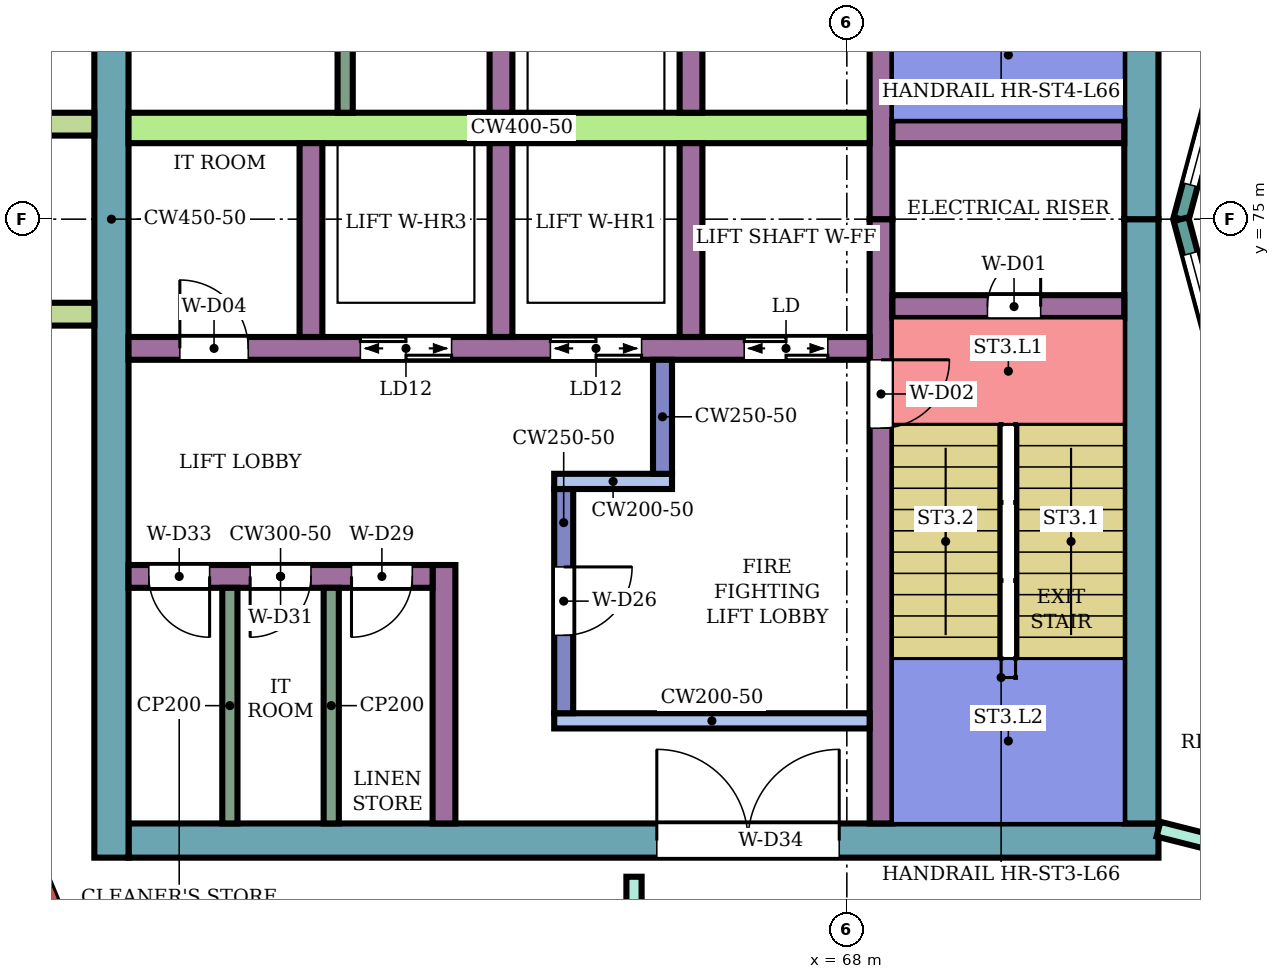
"""IFC4 building model, lengths in metres.
Left out: names, types, materials, properties, quantities, classifications, styles, units other than length and angle.
Written with IfcOpenShell. Run it as: python <this file> out.ifc"""

import sys

from ifc_helpers import new_model, si_unit, direction, frame, frame_2d, origin, place, context, subcontext, project, spatial, rectangle, extrude, element, fill, save


model = new_model("IFC4")
c1 = context("Model", 3, precision=1e-05, world=origin(), true_north=direction((0.0, 1.0)))
c2 = subcontext(c1, "Body", "Model", "MODEL_VIEW")
j1 = project(units=[si_unit("LENGTHUNIT", "METRE"), si_unit("PLANEANGLEUNIT", "RADIAN")], contexts=[c1])
p1 = place(None, origin())
s1 = spatial("IfcSite", under=j1, at=p1, CompositionType="ELEMENT")
p2 = place(p1, origin())
s2 = spatial("IfcBuilding", under=s1, at=p2, CompositionType="ELEMENT")
p3 = place(p2, frame((0.0, 0.0, 288.3)))
s3 = spatial("IfcBuildingStorey", under=s2, at=p3, CompositionType="ELEMENT", Elevation=288.3)
p4 = place(p3, frame((72.1, 66.825, 0.0), z_axis=(0.0, 0.0, 1.0), x_axis=(-1.0, 0.0, 0.0)))
e1 = element("IfcWall", 1, at=p4, inside=s3, PredefinedType="SHEAR", context=c2, shape_type="SweptSolid", body=[
    extrude(rectangle(XDim=13.55, YDim=0.45, at=frame_2d((6.775, 0.0))), origin(), (0.0, 0.0, 1.0), 3.88),
])
p5 = place(p4, frame((4.2, 0.0, 0.0)))
e2 = element("IfcOpeningElement", 2, at=p5, cuts=e1, PredefinedType="OPENING", context=c2, shape_type="SweptSolid", body=[
    extrude(rectangle(XDim=2.4, YDim=2.4, at=frame_2d((1.2, 1.2))), frame((0.0, 0.235, 0.0), z_axis=(0.0, -1.0, 0.0), x_axis=(1.0, 0.0, 0.0)), (0.0, 0.0, 1.0), 0.47),
])
for number, where, z_axis, x_axis in (
    (3, (71.875, 75.0, 0.0), (0.0, 0.0, 1.0), (0.0, -1.0, 0.0)),
    (4, (71.875, 82.95, 0.0), (0.0, 0.0, 1.0), (0.0, -1.0, 0.0)),
):
    element("IfcWall", number, at=place(p3, frame(where, z_axis=z_axis, x_axis=x_axis)), inside=s3, PredefinedType="SHEAR", context=c2, shape_type="SweptSolid", body=[
        extrude(rectangle(XDim=7.95, YDim=0.45, at=frame_2d((3.975, 0.0))), origin(), (0.0, 0.0, 1.0), 3.88),
    ])
p6 = place(p3, frame((58.325, 83.4, 0.0), z_axis=(0.0, 0.0, 1.0), x_axis=(0.0, -1.0, 0.0)))
e5 = element("IfcWall", 5, at=p6, inside=s3, PredefinedType="SHEAR", context=c2, shape_type="SweptSolid", body=[
    extrude(rectangle(XDim=16.8, YDim=0.45, at=frame_2d((8.4, 0.0))), origin(), (0.0, 0.0, 1.0), 3.88),
])
p7 = place(p3, frame((68.45, 75.0, 0.0), z_axis=(0.0, 0.0, 1.0), x_axis=(0.0, -1.0, 0.0)))
e6 = element("IfcWall", 6, at=p7, inside=s3, PredefinedType="SHEAR", context=c2, shape_type="SweptSolid", body=[
    extrude(rectangle(XDim=7.95, YDim=0.3, at=frame_2d((3.975, 0.0))), origin(), (0.0, 0.0, 1.0), 3.88),
])
p8 = place(p7, frame((1.85, 0.0, 0.0)))
e7 = element("IfcOpeningElement", 7, at=p8, cuts=e6, PredefinedType="OPENING", context=c2, shape_type="SweptSolid", body=[
    extrude(rectangle(XDim=0.9, YDim=2.1, at=frame_2d((0.45, 1.05))), frame((0.0, 0.16, 0.0), z_axis=(0.0, -1.0, 0.0), x_axis=(1.0, 0.0, 0.0)), (0.0, 0.0, 1.0), 0.32),
])
p9 = place(p3, frame((68.45, 82.95, 0.0), z_axis=(0.0, 0.0, 1.0), x_axis=(0.0, -1.0, 0.0)))
e8 = element("IfcWall", 8, at=p9, inside=s3, PredefinedType="SHEAR", context=c2, shape_type="SweptSolid", body=[
    extrude(rectangle(XDim=7.95, YDim=0.3, at=frame_2d((3.975, 0.0))), origin(), (0.0, 0.0, 1.0), 3.88),
])
p10 = place(p9, frame((0.6, 0.0, 0.0)))
e9 = element("IfcOpeningElement", 9, at=p10, cuts=e8, PredefinedType="OPENING", context=c2, shape_type="SweptSolid", body=[
    extrude(rectangle(XDim=0.9, YDim=2.1, at=frame_2d((0.45, 1.05))), frame((0.0, 0.16, 0.0), z_axis=(0.0, -1.0, 0.0), x_axis=(1.0, 0.0, 0.0)), (0.0, 0.0, 1.0), 0.32),
])
p11 = place(p3, frame((71.65, 73.85, 0.0), z_axis=(0.0, 0.0, 1.0), x_axis=(-1.0, 0.0, 0.0)))
e10 = element("IfcWall", 10, at=p11, inside=s3, PredefinedType="SHEAR", context=c2, shape_type="SweptSolid", body=[
    extrude(rectangle(XDim=3.05, YDim=0.3, at=frame_2d((1.525, 0.0))), origin(), (0.0, 0.0, 1.0), 3.88),
])
p12 = place(p11, frame((1.1, 0.0, 0.0)))
e11 = element("IfcOpeningElement", 11, at=p12, cuts=e10, PredefinedType="OPENING", context=c2, shape_type="SweptSolid", body=[
    extrude(rectangle(XDim=0.7, YDim=2.0, at=frame_2d((0.35, 1.0))), frame((0.0, 0.16, 0.0), z_axis=(0.0, -1.0, 0.0), x_axis=(1.0, 0.0, 0.0)), (0.0, 0.0, 1.0), 0.32),
])
p13 = place(p3, frame((71.65, 76.15, 0.0), z_axis=(0.0, 0.0, 1.0), x_axis=(-1.0, 0.0, 0.0)))
e12 = element("IfcWall", 12, at=p13, inside=s3, PredefinedType="SHEAR", context=c2, shape_type="SweptSolid", body=[
    extrude(rectangle(XDim=3.05, YDim=0.3, at=frame_2d((1.525, 0.0))), origin(), (0.0, 0.0, 1.0), 3.88),
])
p14 = place(p3, frame((68.3, 73.3, 0.0), z_axis=(0.0, 0.0, 1.0), x_axis=(-1.0, 0.0, 0.0)))
e13 = element("IfcWall", 13, at=p14, inside=s3, PredefinedType="SHEAR", context=c2, shape_type="SweptSolid", body=[
    extrude(rectangle(XDim=9.75, YDim=0.3, at=frame_2d((4.875, 0.0))), origin(), (0.0, 0.0, 1.0), 3.88),
])
p15 = place(p14, frame((0.55, 0.0, 0.0)))
e14 = element("IfcOpeningElement", 14, at=p15, cuts=e13, PredefinedType="OPENING", context=c2, shape_type="SweptSolid", body=[
    extrude(rectangle(XDim=1.1, YDim=2.1, at=frame_2d((0.55, 1.05))), frame((0.0, 0.16, 0.0), z_axis=(0.0, -1.0, 0.0), x_axis=(1.0, 0.0, 0.0)), (0.0, 0.0, 1.0), 0.32),
])
p16 = place(p14, frame((3.0, 0.0, 0.0)))
e15 = element("IfcOpeningElement", 15, at=p16, cuts=e13, PredefinedType="OPENING", context=c2, shape_type="SweptSolid", body=[
    extrude(rectangle(XDim=1.2, YDim=2.1, at=frame_2d((0.6, 1.05))), frame((0.0, 0.16, 0.0), z_axis=(0.0, -1.0, 0.0), x_axis=(1.0, 0.0, 0.0)), (0.0, 0.0, 1.0), 0.32),
])
p17 = place(p14, frame((5.5, 0.0, 0.0)))
e16 = element("IfcOpeningElement", 16, at=p17, cuts=e13, PredefinedType="OPENING", context=c2, shape_type="SweptSolid", body=[
    extrude(rectangle(XDim=1.2, YDim=2.1, at=frame_2d((0.6, 1.05))), frame((0.0, 0.16, 0.0), z_axis=(0.0, -1.0, 0.0), x_axis=(1.0, 0.0, 0.0)), (0.0, 0.0, 1.0), 0.32),
])
p18 = place(p14, frame((8.175, 0.0, 0.0)))
e17 = element("IfcOpeningElement", 17, at=p18, cuts=e13, PredefinedType="OPENING", context=c2, shape_type="SweptSolid", body=[
    extrude(rectangle(XDim=0.9, YDim=2.1, at=frame_2d((0.45, 1.05))), frame((0.0, 0.16, 0.0), z_axis=(0.0, -1.0, 0.0), x_axis=(1.0, 0.0, 0.0)), (0.0, 0.0, 1.0), 0.32),
])
p19 = place(p3, frame((68.3, 76.2, 0.0), z_axis=(0.0, 0.0, 1.0), x_axis=(-1.0, 0.0, 0.0)))
e18 = element("IfcWall", 18, at=p19, inside=s3, PredefinedType="SHEAR", context=c2, shape_type="SweptSolid", body=[
    extrude(rectangle(XDim=9.75, YDim=0.4, at=frame_2d((4.875, 0.0))), origin(), (0.0, 0.0, 1.0), 3.88),
])
for number, where, z_axis, x_axis in (
    (19, (65.95, 76.0, 0.0), (0.0, 0.0, 1.0), (0.0, -1.0, 0.0)),
    (20, (63.45, 76.0, 0.0), (0.0, 0.0, 1.0), (0.0, -1.0, 0.0)),
    (21, (60.95, 76.0, 0.0), (0.0, 0.0, 1.0), (0.0, -1.0, 0.0)),
    (22, (65.95, 78.95, 0.0), (0.0, 0.0, 1.0), (0.0, -1.0, 0.0)),
    (23, (63.45, 78.95, 0.0), (0.0, 0.0, 1.0), (0.0, -1.0, 0.0)),
):
    element("IfcWall", number, at=place(p3, frame(where, z_axis=z_axis, x_axis=x_axis)), inside=s3, PredefinedType="SHEAR", context=c2, shape_type="SweptSolid", body=[
        extrude(rectangle(XDim=2.55, YDim=0.3, at=frame_2d((1.275, 0.0))), origin(), (0.0, 0.0, 1.0), 3.88),
    ])
p20 = place(p3, frame((68.3, 68.4, 0.0), z_axis=(0.0, 0.0, 1.0), x_axis=(-1.0, 0.0, 0.0)))
e24 = element("IfcWall", 24, at=p20, inside=s3, PredefinedType="SHEAR", context=c2, shape_type="SweptSolid", body=[
    extrude(rectangle(XDim=4.15, YDim=0.2, at=frame_2d((2.075, 0.0))), origin(), (0.0, 0.0, 1.0), 3.88),
])
p21 = place(p3, frame((64.275, 71.45, 0.0), z_axis=(0.0, 0.0, 1.0), x_axis=(0.0, -1.0, 0.0)))
e25 = element("IfcWall", 25, at=p21, inside=s3, PredefinedType="SHEAR", context=c2, shape_type="SweptSolid", body=[
    extrude(rectangle(XDim=2.95, YDim=0.25, at=frame_2d((1.475, 0.0))), origin(), (0.0, 0.0, 1.0), 3.88),
])
p22 = place(p21, frame((1.025, 0.0, 0.0)))
e26 = element("IfcOpeningElement", 26, at=p22, cuts=e25, PredefinedType="OPENING", context=c2, shape_type="SweptSolid", body=[
    extrude(rectangle(XDim=0.9, YDim=2.1, at=frame_2d((0.45, 1.05))), frame((0.0, 0.135, 0.0), z_axis=(0.0, -1.0, 0.0), x_axis=(1.0, 0.0, 0.0)), (0.0, 0.0, 1.0), 0.27),
])
p23 = place(p3, frame((65.7, 71.55, 0.0), z_axis=(0.0, 0.0, 1.0), x_axis=(-1.0, 0.0, 0.0)))
e27 = element("IfcWall", 27, at=p23, inside=s3, PredefinedType="SHEAR", context=c2, shape_type="SweptSolid", body=[
    extrude(rectangle(XDim=1.55, YDim=0.2, at=frame_2d((0.775, 0.0))), origin(), (0.0, 0.0, 1.0), 3.88),
])
p24 = place(p3, frame((65.575, 73.15, 0.0), z_axis=(0.0, 0.0, 1.0), x_axis=(0.0, -1.0, 0.0)))
e28 = element("IfcWall", 28, at=p24, inside=s3, PredefinedType="SHEAR", context=c2, shape_type="SweptSolid", body=[
    extrude(rectangle(XDim=1.5, YDim=0.25, at=frame_2d((0.75, 0.0))), origin(), (0.0, 0.0, 1.0), 3.88),
])
p25 = place(p3, frame((62.7, 70.45, 0.0), z_axis=(0.0, 0.0, 1.0), x_axis=(0.0, -1.0, 0.0)))
e29 = element("IfcWall", 29, at=p25, inside=s3, PredefinedType="SHEAR", context=c2, shape_type="SweptSolid", body=[
    extrude(rectangle(XDim=3.4, YDim=0.3, at=frame_2d((1.7, 0.0))), origin(), (0.0, 0.0, 1.0), 3.88),
])
p26 = place(p3, frame((62.55, 70.3, 0.0), z_axis=(0.0, 0.0, 1.0), x_axis=(-1.0, 0.0, 0.0)))
e30 = element("IfcWall", 30, at=p26, inside=s3, PredefinedType="SHEAR", context=c2, shape_type="SweptSolid", body=[
    extrude(rectangle(XDim=4.0, YDim=0.3, at=frame_2d((2.0, 0.0))), origin(), (0.0, 0.0, 1.0), 3.88),
])
p27 = place(p26, frame((0.267, 0.0, 0.0)))
e31 = element("IfcOpeningElement", 31, at=p27, cuts=e30, PredefinedType="OPENING", context=c2, shape_type="SweptSolid", body=[
    extrude(rectangle(XDim=0.8, YDim=2.1, at=frame_2d((0.4, 1.05))), frame((0.0, 0.16, 0.0), z_axis=(0.0, -1.0, 0.0), x_axis=(1.0, 0.0, 0.0)), (0.0, 0.0, 1.0), 0.32),
])
p28 = place(p26, frame((1.6, 0.0, 0.0)))
e32 = element("IfcOpeningElement", 32, at=p28, cuts=e30, PredefinedType="OPENING", context=c2, shape_type="SweptSolid", body=[
    extrude(rectangle(XDim=0.8, YDim=2.1, at=frame_2d((0.4, 1.05))), frame((0.0, 0.16, 0.0), z_axis=(0.0, -1.0, 0.0), x_axis=(1.0, 0.0, 0.0)), (0.0, 0.0, 1.0), 0.32),
])
p29 = place(p26, frame((2.933, 0.0, 0.0)))
e33 = element("IfcOpeningElement", 33, at=p29, cuts=e30, PredefinedType="OPENING", context=c2, shape_type="SweptSolid", body=[
    extrude(rectangle(XDim=0.8, YDim=2.1, at=frame_2d((0.4, 1.05))), frame((0.0, 0.16, 0.0), z_axis=(0.0, -1.0, 0.0), x_axis=(1.0, 0.0, 0.0)), (0.0, 0.0, 1.0), 0.32),
])
for number, where, z_axis, x_axis in (
    (34, (58.1, 76.25, 0.0), (0.0, 0.0, 1.0), (-1.0, 0.0, 0.0)),
    (35, (58.1, 73.75, 0.0), (0.0, 0.0, 1.0), (-1.0, 0.0, 0.0)),
):
    element("IfcWall", number, at=place(p3, frame(where, z_axis=z_axis, x_axis=x_axis)), inside=s3, PredefinedType="NOTDEFINED", context=c2, shape_type="SweptSolid", body=[
        extrude(rectangle(XDim=2.416, YDim=0.3, at=frame_2d((1.208, 0.0))), origin(), (0.0, 0.0, 1.0), 4.2),
    ])
p30 = place(p3, frame((73.415, 78.802, 0.0), z_axis=(0.0, 0.0, 1.0), x_axis=(-0.258789828301, -0.965933654434, 0.0)))
e36 = element("IfcWall", 36, at=p30, inside=s3, PredefinedType="NOTDEFINED", context=c2, shape_type="SweptSolid", body=[
    extrude(rectangle(XDim=3.936, YDim=0.2, at=frame_2d((1.968, 0.0))), origin(), (0.0, 0.0, 1.0), 4.2),
])
p31 = place(p30, frame((0.468, 0.0, 0.9)))
e37 = element("IfcOpeningElement", 37, at=p31, cuts=e36, PredefinedType="OPENING", context=c2, shape_type="SweptSolid", body=[
    extrude(rectangle(XDim=3.0, YDim=2.3, at=frame_2d((1.5, 1.15))), frame((0.0, 0.11, 0.0), z_axis=(0.0, -1.0, 0.0), x_axis=(1.0, 0.0, 0.0)), (0.0, 0.0, 1.0), 0.22),
])
p32 = place(p3, frame((72.396, 75.0, 0.0), z_axis=(0.0, 0.0, 1.0), x_axis=(0.258789828301, -0.965933654434, 0.0)))
e38 = element("IfcWall", 38, at=p32, inside=s3, PredefinedType="NOTDEFINED", context=c2, shape_type="SweptSolid", body=[
    extrude(rectangle(XDim=3.936, YDim=0.2, at=frame_2d((1.968, 0.0))), origin(), (0.0, 0.0, 1.0), 4.2),
])
p33 = place(p32, frame((0.468, 0.0, 0.9)))
e39 = element("IfcOpeningElement", 39, at=p33, cuts=e38, PredefinedType="OPENING", context=c2, shape_type="SweptSolid", body=[
    extrude(rectangle(XDim=3.0, YDim=2.3, at=frame_2d((1.5, 1.15))), frame((0.0, 0.11, 0.0), z_axis=(0.0, -1.0, 0.0), x_axis=(1.0, 0.0, 0.0)), (0.0, 0.0, 1.0), 0.22),
])
p34 = place(p3, frame((65.2, 65.2, 0.0), z_axis=(0.0, 0.0, 1.0), x_axis=(0.0, 1.0, 0.0)))
e40 = element("IfcWall", 40, at=p34, inside=s3, PredefinedType="PARTITIONING", context=c2, shape_type="SweptSolid", body=[
    extrude(rectangle(XDim=1.149, YDim=0.2, at=frame_2d((0.575, 0.0))), origin(), (0.0, 0.0, 1.0), 3.75),
])
p35 = place(p3, frame((72.1, 66.975, 0.0), z_axis=(0.0, 0.0, 1.0), x_axis=(0.969471314457, -0.245204752086, 0.0)))
e41 = element("IfcWall", 41, at=p35, inside=s3, PredefinedType="PARTITIONING", context=c2, shape_type="SweptSolid", body=[
    extrude(rectangle(XDim=2.582, YDim=0.2, at=frame_2d((1.291, 0.0))), origin(), (0.0, 0.0, 1.0), 3.75),
])
p36 = place(p35, frame((0.841, 0.0, 0.0)))
e42 = element("IfcOpeningElement", 42, at=p36, cuts=e41, PredefinedType="OPENING", context=c2, shape_type="SweptSolid", body=[
    extrude(rectangle(XDim=0.9, YDim=2.1, at=frame_2d((0.45, 1.05))), frame((0.0, 0.11, 0.0), z_axis=(0.0, -1.0, 0.0), x_axis=(1.0, 0.0, 0.0)), (0.0, 0.0, 1.0), 0.22),
])
p37 = place(p3, frame((61.4, 78.95, 0.0), z_axis=(0.0, 0.0, 1.0), x_axis=(0.0, -1.0, 0.0)))
e43 = element("IfcWall", 43, at=p37, inside=s3, PredefinedType="PARTITIONING", context=c2, shape_type="SweptSolid", body=[
    extrude(rectangle(XDim=2.55, YDim=0.2, at=frame_2d((1.275, 0.0))), origin(), (0.0, 0.0, 1.0), 3.88),
])
for number, where, z_axis, x_axis in (
    (44, (61.217, 70.15, 0.0), (0.0, 0.0, 1.0), (0.0, -1.0, 0.0)),
    (45, (59.883, 70.15, 0.0), (0.0, 0.0, 1.0), (0.0, -1.0, 0.0)),
):
    element("IfcWall", number, at=place(p3, frame(where, z_axis=z_axis, x_axis=x_axis)), inside=s3, PredefinedType="PARTITIONING", context=c2, shape_type="SweptSolid", body=[
        extrude(rectangle(XDim=3.1, YDim=0.2, at=frame_2d((1.55, 0.0))), origin(), (0.0, 0.0, 1.0), 3.88),
    ])
p38 = place(p31, origin())
e46 = element("IfcWindow", 46, at=p38, inside=s3, PartitioningType="SINGLE_PANEL", PredefinedType="WINDOW", context=c2, shape_type="SweptSolid", body=[
    extrude(rectangle(XDim=3.0, YDim=2.3, at=frame_2d((1.5, 1.15))), frame((0.0, 0.03, 0.0), z_axis=(0.0, -1.0, 0.0), x_axis=(1.0, 0.0, 0.0)), (0.0, 0.0, 1.0), 0.06),
])
fill(e37, e46)
p39 = place(p33, origin())
e47 = element("IfcWindow", 47, at=p39, inside=s3, PartitioningType="SINGLE_PANEL", PredefinedType="WINDOW", context=c2, shape_type="SweptSolid", body=[
    extrude(rectangle(XDim=3.0, YDim=2.3, at=frame_2d((1.5, 1.15))), frame((0.0, 0.03, 0.0), z_axis=(0.0, -1.0, 0.0), x_axis=(1.0, 0.0, 0.0)), (0.0, 0.0, 1.0), 0.06),
])
fill(e39, e47)
p40 = place(p12, frame((0.7, 0.0, 0.0), z_axis=(0.0, 0.0, 1.0), x_axis=(-1.0, 0.0, 0.0)))
e48 = element("IfcDoor", 48, at=p40, inside=s3, OperationType="SINGLE_SWING_RIGHT", PredefinedType="DOOR", context=c2, shape_type="SweptSolid", body=[
    extrude(rectangle(XDim=0.7, YDim=2.0, at=frame_2d((0.35, 1.0))), frame((0.0, 0.025, 0.0), z_axis=(0.0, -1.0, 0.0), x_axis=(1.0, 0.0, 0.0)), (0.0, 0.0, 1.0), 0.05),
])
fill(e11, e48)
p41 = place(p8, origin())
e49 = element("IfcDoor", 49, at=p41, inside=s3, OperationType="SINGLE_SWING_LEFT", PredefinedType="DOOR", context=c2, shape_type="SweptSolid", body=[
    extrude(rectangle(XDim=0.9, YDim=2.1, at=frame_2d((0.45, 1.05))), frame((0.0, 0.025, 0.0), z_axis=(0.0, -1.0, 0.0), x_axis=(1.0, 0.0, 0.0)), (0.0, 0.0, 1.0), 0.05),
])
fill(e7, e49)
p42 = place(p15, origin())
e50 = element("IfcDoor", 50, at=p42, inside=s3, OperationType="DOUBLE_DOOR_SLIDING", PredefinedType="DOOR", context=c2, shape_type="SweptSolid", body=[
    extrude(rectangle(XDim=1.1, YDim=2.1, at=frame_2d((0.55, 1.05))), frame((0.0, 0.025, 0.0), z_axis=(0.0, -1.0, 0.0), x_axis=(1.0, 0.0, 0.0)), (0.0, 0.0, 1.0), 0.05),
])
fill(e14, e50)
p43 = place(p16, origin())
e51 = element("IfcDoor", 51, at=p43, inside=s3, OperationType="DOUBLE_DOOR_SLIDING", PredefinedType="DOOR", context=c2, shape_type="SweptSolid", body=[
    extrude(rectangle(XDim=1.2, YDim=2.1, at=frame_2d((0.6, 1.05))), frame((0.0, 0.025, 0.0), z_axis=(0.0, -1.0, 0.0), x_axis=(1.0, 0.0, 0.0)), (0.0, 0.0, 1.0), 0.05),
])
fill(e15, e51)
p44 = place(p17, origin())
e52 = element("IfcDoor", 52, at=p44, inside=s3, OperationType="DOUBLE_DOOR_SLIDING", PredefinedType="DOOR", context=c2, shape_type="SweptSolid", body=[
    extrude(rectangle(XDim=1.2, YDim=2.1, at=frame_2d((0.6, 1.05))), frame((0.0, 0.025, 0.0), z_axis=(0.0, -1.0, 0.0), x_axis=(1.0, 0.0, 0.0)), (0.0, 0.0, 1.0), 0.05),
])
fill(e16, e52)
p45 = place(p18, frame((0.9, 0.0, 0.0), z_axis=(0.0, 0.0, 1.0), x_axis=(-1.0, 0.0, 0.0)))
e53 = element("IfcDoor", 53, at=p45, inside=s3, OperationType="SINGLE_SWING_LEFT", PredefinedType="DOOR", context=c2, shape_type="SweptSolid", body=[
    extrude(rectangle(XDim=0.9, YDim=2.1, at=frame_2d((0.45, 1.05))), frame((0.0, 0.025, 0.0), z_axis=(0.0, -1.0, 0.0), x_axis=(1.0, 0.0, 0.0)), (0.0, 0.0, 1.0), 0.05),
])
fill(e17, e53)
p46 = place(p22, origin())
e54 = element("IfcDoor", 54, at=p46, inside=s3, OperationType="SINGLE_SWING_LEFT", PredefinedType="DOOR", context=c2, shape_type="SweptSolid", body=[
    extrude(rectangle(XDim=0.9, YDim=2.1, at=frame_2d((0.45, 1.05))), frame((0.0, 0.025, 0.0), z_axis=(0.0, -1.0, 0.0), x_axis=(1.0, 0.0, 0.0)), (0.0, 0.0, 1.0), 0.05),
])
fill(e26, e54)
p47 = place(p27, origin())
e55 = element("IfcDoor", 55, at=p47, inside=s3, OperationType="SINGLE_SWING_RIGHT", PredefinedType="DOOR", context=c2, shape_type="SweptSolid", body=[
    extrude(rectangle(XDim=0.8, YDim=2.1, at=frame_2d((0.4, 1.05))), frame((0.0, 0.025, 0.0), z_axis=(0.0, -1.0, 0.0), x_axis=(1.0, 0.0, 0.0)), (0.0, 0.0, 1.0), 0.05),
])
fill(e31, e55)
p48 = place(p28, origin())
e56 = element("IfcDoor", 56, at=p48, inside=s3, OperationType="SINGLE_SWING_RIGHT", PredefinedType="DOOR", context=c2, shape_type="SweptSolid", body=[
    extrude(rectangle(XDim=0.8, YDim=2.1, at=frame_2d((0.4, 1.05))), frame((0.0, 0.025, 0.0), z_axis=(0.0, -1.0, 0.0), x_axis=(1.0, 0.0, 0.0)), (0.0, 0.0, 1.0), 0.05),
])
fill(e32, e56)
p49 = place(p29, origin())
e57 = element("IfcDoor", 57, at=p49, inside=s3, OperationType="SINGLE_SWING_LEFT", PredefinedType="DOOR", context=c2, shape_type="SweptSolid", body=[
    extrude(rectangle(XDim=0.8, YDim=2.1, at=frame_2d((0.4, 1.05))), frame((0.0, 0.025, 0.0), z_axis=(0.0, -1.0, 0.0), x_axis=(1.0, 0.0, 0.0)), (0.0, 0.0, 1.0), 0.05),
])
fill(e33, e57)
p50 = place(p5, frame((2.4, 0.0, 0.0), z_axis=(0.0, 0.0, 1.0), x_axis=(-1.0, 0.0, 0.0)))
e58 = element("IfcDoor", 58, at=p50, inside=s3, OperationType="DOUBLE_DOOR_SINGLE_SWING", PredefinedType="DOOR", context=c2, shape_type="SweptSolid", body=[
    extrude(rectangle(XDim=2.4, YDim=2.4, at=frame_2d((1.2, 1.2))), frame((0.0, 0.025, 0.0), z_axis=(0.0, -1.0, 0.0), x_axis=(1.0, 0.0, 0.0)), (0.0, 0.0, 1.0), 0.05),
])
fill(e2, e58)
save(model, sys.argv[1])
